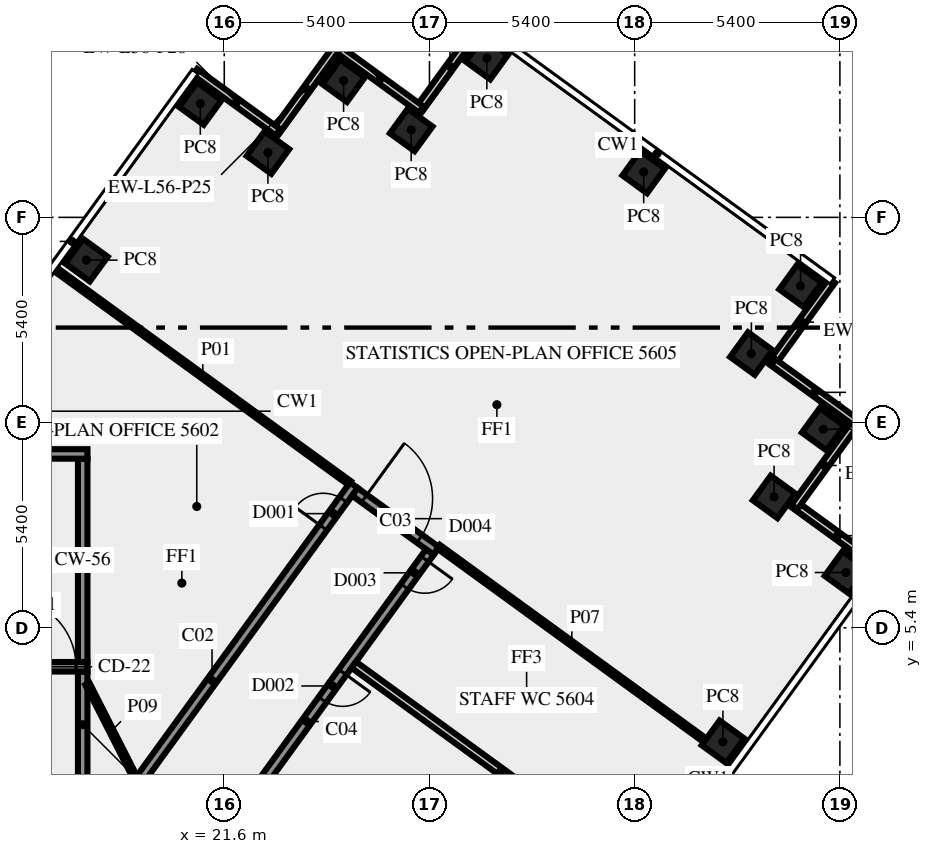
"""IFC4 building model, lengths in metres.
Left out: names, types, materials, properties, quantities, classifications, styles, units other than length and angle.
Written with IfcOpenShell. Run it as: python <this file> out.ifc"""

import sys

from ifc_helpers import new_model, si_unit, direction, frame, frame_2d, origin, origin_2d, place, context, subcontext, project, spatial, rectangle, extrude, element, fill, save


model = new_model("IFC4")
c1 = context("Model", 3, precision=1e-05, world=origin(), true_north=direction((0.0, 1.0)))
c2 = subcontext(c1, "Body", "Model", "MODEL_VIEW")
j1 = project(units=[si_unit("LENGTHUNIT", "METRE"), si_unit("PLANEANGLEUNIT", "RADIAN")], contexts=[c1])
p1 = place(None, origin())
s1 = spatial("IfcSite", under=j1, at=p1, CompositionType="ELEMENT")
p2 = place(p1, origin())
s2 = spatial("IfcBuilding", under=s1, at=p2, CompositionType="ELEMENT")
p3 = place(p2, frame((0.0, 0.0, 238.0)))
s3 = spatial("IfcBuildingStorey", under=s2, at=p3, CompositionType="ELEMENT", Elevation=238.0)
for number, where, z_axis, x_axis in (
    (1, (34.722, 2.4, 0.0), (0.0, 0.0, 1.0), (0.588, 0.809, 0.0)),
    (2, (37.96, 6.855, 0.0), (0.0, 0.0, 1.0), (0.588, 0.809, 0.0)),
    (3, (36.068, 8.844, 0.0), (0.0, 0.0, 1.0), (0.588, 0.809, 0.0)),
    (4, (37.36, 10.625, 0.0), (0.0, 0.0, 1.0), (0.588, 0.809, 0.0)),
    (5, (35.471, 12.616, 0.0), (0.0, 0.0, 1.0), (-0.809, 0.588, 0.0)),
    (6, (36.765, 14.395, 0.0), (0.0, 0.0, 1.0), (-0.809, 0.588, 0.0)),
    (7, (32.637, 17.393, 0.0), (0.0, 0.0, 1.0), (-0.809, 0.588, 0.0)),
    (8, (28.51, 20.39, 0.0), (0.0, 0.0, 1.0), (-0.588, -0.809, 0.0)),
    (9, (26.519, 18.5, 0.0), (0.0, 0.0, 1.0), (-0.809, 0.588, 0.0)),
    (10, (24.74, 19.795, 0.0), (0.0, 0.0, 1.0), (-0.588, -0.809, 0.0)),
    (11, (22.749, 17.904, 0.0), (0.0, 0.0, 1.0), (-0.588, -0.809, 0.0)),
    (12, (20.97, 19.195, 0.0), (0.0, 0.0, 1.0), (-0.588, -0.809, 0.0)),
    (13, (17.974, 15.075, 0.0), (0.0, 0.0, 1.0), (-0.588, -0.809, 0.0)),
):
    element("IfcColumn", number, at=place(p3, frame(where, z_axis=z_axis, x_axis=x_axis)), inside=s3, PredefinedType="COLUMN", context=c2, shape_type="SweptSolid", body=[
        extrude(rectangle(XDim=0.8, YDim=0.8, at=origin_2d()), origin(), (0.0, 0.0, 1.0), 3.4),
    ])
for number, where, z_axis, x_axis in (
    (14, (36.005, 12.352, 0.0), (0.0, 0.0, 1.0), (0.588, 0.809, 0.0)),
    (15, (28.334, 21.262, 0.0), (0.0, 0.0, 1.0), (-0.588, -0.809, 0.0)),
):
    element("IfcWall", number, at=place(p3, frame(where, z_axis=z_axis, x_axis=x_axis)), inside=s3, PredefinedType="SOLIDWALL", context=c2, shape_type="SweptSolid", body=[
        extrude(rectangle(XDim=2.7, YDim=0.2, at=frame_2d((1.35, 0.0))), origin(), (0.0, 0.0, 1.0), 3.4),
    ])
p4 = place(p3, frame((26.785, 19.036, 0.0), z_axis=(0.0, 0.0, 1.0), x_axis=(-0.809064397168, 0.587720002413, 0.0)))
e16 = element("IfcWall", 16, at=p4, inside=s3, PredefinedType="SOLIDWALL", context=c2, shape_type="SweptSolid", body=[
    extrude(rectangle(XDim=2.7, YDim=0.2, at=frame_2d((1.35, 0.0))), origin(), (0.0, 0.0, 1.0), 3.4),
])
for number, where, z_axis, x_axis in (
    (17, (24.563, 20.665, 0.0), (0.0, 0.0, 1.0), (-0.588, -0.809, 0.0)),
    (18, (23.013, 18.438, 0.0), (0.0, 0.0, 1.0), (-0.809, 0.588, 0.0)),
    (19, (38.829, 7.031, 0.0), (0.0, 0.0, 1.0), (-0.809, 0.588, 0.0)),
    (20, (36.602, 8.58, 0.0), (0.0, 0.0, 1.0), (0.588, 0.809, 0.0)),
    (21, (38.231, 10.802, 0.0), (0.0, 0.0, 1.0), (-0.809, 0.588, 0.0)),
):
    element("IfcWall", number, at=place(p3, frame(where, z_axis=z_axis, x_axis=x_axis)), inside=s3, PredefinedType="SOLIDWALL", context=c2, shape_type="SweptSolid", body=[
        extrude(rectangle(XDim=2.7, YDim=0.2, at=frame_2d((1.35, 0.0))), origin(), (0.0, 0.0, 1.0), 3.4),
    ])
p5 = place(p3, frame((17.875, 1.45, 0.0), z_axis=(0.0, 0.0, 1.0), x_axis=(0.0, 1.0, 0.0)))
e22 = element("IfcWall", 22, at=p5, inside=s3, PredefinedType="SHEAR", context=c2, shape_type="SweptSolid", body=[
    extrude(rectangle(XDim=2.8, YDim=0.25, at=frame_2d((1.4, 0.0))), origin(), (0.0, 0.0, 1.0), 3.4),
])
p6 = place(p3, frame((7.5, 4.375, 0.0), z_axis=(0.0, 0.0, 1.0), x_axis=(1.0, 0.0, 0.0)))
e23 = element("IfcWall", 23, at=p6, inside=s3, PredefinedType="SHEAR", context=c2, shape_type="SweptSolid", body=[
    extrude(rectangle(XDim=10.5, YDim=0.25, at=frame_2d((5.25, 0.0))), origin(), (0.0, 0.0, 1.0), 3.4),
])
p7 = place(p6, frame((8.4, 0.0, 0.0)))
e24 = element("IfcOpeningElement", 24, at=p7, cuts=e23, PredefinedType="OPENING", context=c2, shape_type="SweptSolid", body=[
    extrude(rectangle(XDim=1.8, YDim=2.1, at=frame_2d((0.9, 1.05))), frame((0.0, 0.135, 0.0), z_axis=(0.0, -1.0, 0.0), x_axis=(1.0, 0.0, 0.0)), (0.0, 0.0, 1.0), 0.27),
])
p8 = place(p3, frame((17.875, 4.5, 0.0), z_axis=(0.0, 0.0, 1.0), x_axis=(0.0, 1.0, 0.0)))
e25 = element("IfcWall", 25, at=p8, inside=s3, PredefinedType="SHEAR", context=c2, shape_type="SweptSolid", body=[
    extrude(rectangle(XDim=5.35, YDim=0.25, at=frame_2d((2.675, 0.0))), origin(), (0.0, 0.0, 1.0), 3.4),
])
p9 = place(p3, frame((7.5, 9.975, 0.0), z_axis=(0.0, 0.0, 1.0), x_axis=(1.0, 0.0, 0.0)))
e26 = element("IfcWall", 26, at=p9, inside=s3, PredefinedType="SHEAR", context=c2, shape_type="SweptSolid", body=[
    extrude(rectangle(XDim=10.5, YDim=0.25, at=frame_2d((5.25, 0.0))), origin(), (0.0, 0.0, 1.0), 3.4),
])
p10 = place(p9, frame((2.0, 0.0, 1.0)))
e27 = element("IfcOpeningElement", 27, at=p10, cuts=e26, PredefinedType="OPENING", context=c2, shape_type="SweptSolid", body=[
    extrude(rectangle(XDim=1.2, YDim=1.2, at=frame_2d((0.6, 0.6))), frame((0.0, 0.135, 0.0), z_axis=(0.0, -1.0, 0.0), x_axis=(1.0, 0.0, 0.0)), (0.0, 0.0, 1.0), 0.27),
])
p11 = place(p3, frame((17.545, -1.125, 0.0), z_axis=(0.0, 0.0, 1.0), x_axis=(0.587796810203, 0.809008596935, 0.0)))
e28 = element("IfcWall", 28, at=p11, inside=s3, PredefinedType="SOLIDWALL", context=c2, shape_type="SweptSolid", body=[
    extrude(rectangle(XDim=12.703, YDim=0.25, at=frame_2d((6.352, 0.0))), origin(), (0.0, 0.0, 1.0), 3.4),
])
p12 = place(p11, frame((11.329, 0.0, 0.0)))
e29 = element("IfcOpeningElement", 29, at=p12, cuts=e28, PredefinedType="OPENING", context=c2, shape_type="SweptSolid", body=[
    extrude(rectangle(XDim=0.9, YDim=2.1, at=frame_2d((0.45, 1.05))), frame((0.0, 0.135, 0.0), z_axis=(0.0, -1.0, 0.0), x_axis=(1.0, 0.0, 0.0)), (0.0, 0.0, 1.0), 0.27),
])
p13 = place(p3, frame((25.039, 8.978, 0.0), z_axis=(0.0, 0.0, 1.0), x_axis=(0.809006914995, -0.587799125119, 0.0)))
e30 = element("IfcWall", 30, at=p13, inside=s3, PredefinedType="SOLIDWALL", context=c2, shape_type="SweptSolid", body=[
    extrude(rectangle(XDim=2.65, YDim=0.25, at=frame_2d((1.325, 0.0))), origin(), (0.0, 0.0, 1.0), 3.4),
])
p14 = place(p13, frame((0.301, 0.0, 0.0)))
e31 = element("IfcOpeningElement", 31, at=p14, cuts=e30, PredefinedType="OPENING", context=c2, shape_type="SweptSolid", body=[
    extrude(rectangle(XDim=1.8, YDim=2.1, at=frame_2d((0.9, 1.05))), frame((0.0, 0.135, 0.0), z_axis=(0.0, -1.0, 0.0), x_axis=(1.0, 0.0, 0.0)), (0.0, 0.0, 1.0), 0.27),
])
p15 = place(p3, frame((27.009, 7.392, 0.0), z_axis=(0.0, 0.0, 1.0), x_axis=(-0.587776457057, -0.809023384414, 0.0)))
e32 = element("IfcWall", 32, at=p15, inside=s3, PredefinedType="SOLIDWALL", context=c2, shape_type="SweptSolid", body=[
    extrude(rectangle(XDim=11.021, YDim=0.25, at=frame_2d((5.51, 0.0))), origin(), (0.0, 0.0, 1.0), 3.4),
])
p16 = place(p15, frame((3.905, 0.0, 0.0)))
e33 = element("IfcOpeningElement", 33, at=p16, cuts=e32, PredefinedType="OPENING", context=c2, shape_type="SweptSolid", body=[
    extrude(rectangle(XDim=0.9, YDim=2.1, at=frame_2d((0.45, 1.05))), frame((0.0, 0.135, 0.0), z_axis=(0.0, -1.0, 0.0), x_axis=(1.0, 0.0, 0.0)), (0.0, 0.0, 1.0), 0.27),
])
p17 = place(p15, frame((0.225, 0.0, 0.0)))
e34 = element("IfcOpeningElement", 34, at=p17, cuts=e32, PredefinedType="OPENING", context=c2, shape_type="SweptSolid", body=[
    extrude(rectangle(XDim=0.9, YDim=2.1, at=frame_2d((0.45, 1.05))), frame((0.0, 0.135, 0.0), z_axis=(0.0, -1.0, 0.0), x_axis=(1.0, 0.0, 0.0)), (0.0, 0.0, 1.0), 0.27),
])
p18 = place(p3, frame((24.898, 9.209, 0.0), z_axis=(0.0, 0.0, 1.0), x_axis=(-0.809013490065, 0.587790075531, 0.0)))
e35 = element("IfcWall", 35, at=p18, inside=s3, PredefinedType="PARTITIONING", context=c2, shape_type="SweptSolid", body=[
    extrude(rectangle(XDim=9.549, YDim=0.12, at=frame_2d((4.775, 0.0))), origin(), (0.0, 0.0, 1.0), 2.6),
])
p19 = place(p3, frame((27.24, 7.532, 0.0), z_axis=(0.0, 0.0, 1.0), x_axis=(0.809033281668, -0.587762834103, 0.0)))
e36 = element("IfcWall", 36, at=p19, inside=s3, PredefinedType="PARTITIONING", context=c2, shape_type="SweptSolid", body=[
    extrude(rectangle(XDim=8.665, YDim=0.12, at=frame_2d((4.333, 0.0))), origin(), (0.0, 0.0, 1.0), 3.4),
])
p20 = place(p3, frame((32.734, -1.187, 0.0), z_axis=(0.0, 0.0, 1.0), x_axis=(-0.808994684961, 0.587815957341, 0.0)))
e37 = element("IfcWall", 37, at=p20, inside=s3, PredefinedType="SOLIDWALL", context=c2, shape_type="SweptSolid", body=[
    extrude(rectangle(XDim=9.55, YDim=0.2, at=frame_2d((4.775, 0.0))), origin(), (0.0, 0.0, 1.0), 2.6),
])
p21 = place(p3, frame((18.0, 3.925, 0.0), z_axis=(0.0, 0.0, 1.0), x_axis=(0.453950796792, -0.891026752736, 0.0)))
e38 = element("IfcWall", 38, at=p21, inside=s3, PredefinedType="PARTITIONING", context=c2, shape_type="SweptSolid", body=[
    extrude(rectangle(XDim=2.778, YDim=0.12, at=frame_2d((1.389, 0.0))), origin(), (0.0, 0.0, 1.0), 3.4),
])
p22 = place(p7, origin())
e39 = element("IfcDoor", 39, at=p22, inside=s3, OperationType="DOUBLE_DOOR_SINGLE_SWING", PredefinedType="DOOR", context=c2, shape_type="SweptSolid", body=[
    extrude(rectangle(XDim=1.8, YDim=2.1, at=frame_2d((0.9, 1.05))), frame((0.0, 0.025, 0.0), z_axis=(0.0, -1.0, 0.0), x_axis=(1.0, 0.0, 0.0)), (0.0, 0.0, 1.0), 0.05),
])
fill(e24, e39)
p23 = place(p12, origin())
e40 = element("IfcDoor", 40, at=p23, inside=s3, OperationType="SINGLE_SWING_RIGHT", PredefinedType="DOOR", context=c2, shape_type="SweptSolid", body=[
    extrude(rectangle(XDim=0.9, YDim=2.1, at=frame_2d((0.45, 1.05))), frame((0.0, 0.025, 0.0), z_axis=(0.0, -1.0, 0.0), x_axis=(1.0, 0.0, 0.0)), (0.0, 0.0, 1.0), 0.05),
])
fill(e29, e40)
p24 = place(p14, origin())
e41 = element("IfcDoor", 41, at=p24, inside=s3, OperationType="DOUBLE_DOOR_SINGLE_SWING", PredefinedType="DOOR", context=c2, shape_type="SweptSolid", body=[
    extrude(rectangle(XDim=1.8, YDim=2.1, at=frame_2d((0.9, 1.05))), frame((0.0, 0.025, 0.0), z_axis=(0.0, -1.0, 0.0), x_axis=(1.0, 0.0, 0.0)), (0.0, 0.0, 1.0), 0.05),
])
fill(e31, e41)
p25 = place(p16, origin())
e42 = element("IfcDoor", 42, at=p25, inside=s3, OperationType="SINGLE_SWING_LEFT", PredefinedType="DOOR", context=c2, shape_type="SweptSolid", body=[
    extrude(rectangle(XDim=0.9, YDim=2.1, at=frame_2d((0.45, 1.05))), frame((0.0, 0.025, 0.0), z_axis=(0.0, -1.0, 0.0), x_axis=(1.0, 0.0, 0.0)), (0.0, 0.0, 1.0), 0.05),
])
fill(e33, e42)
p26 = place(p17, origin())
e43 = element("IfcDoor", 43, at=p26, inside=s3, OperationType="SINGLE_SWING_LEFT", PredefinedType="DOOR", context=c2, shape_type="SweptSolid", body=[
    extrude(rectangle(XDim=0.9, YDim=2.1, at=frame_2d((0.45, 1.05))), frame((0.0, 0.025, 0.0), z_axis=(0.0, -1.0, 0.0), x_axis=(1.0, 0.0, 0.0)), (0.0, 0.0, 1.0), 0.05),
])
fill(e34, e43)
save(model, sys.argv[1])
